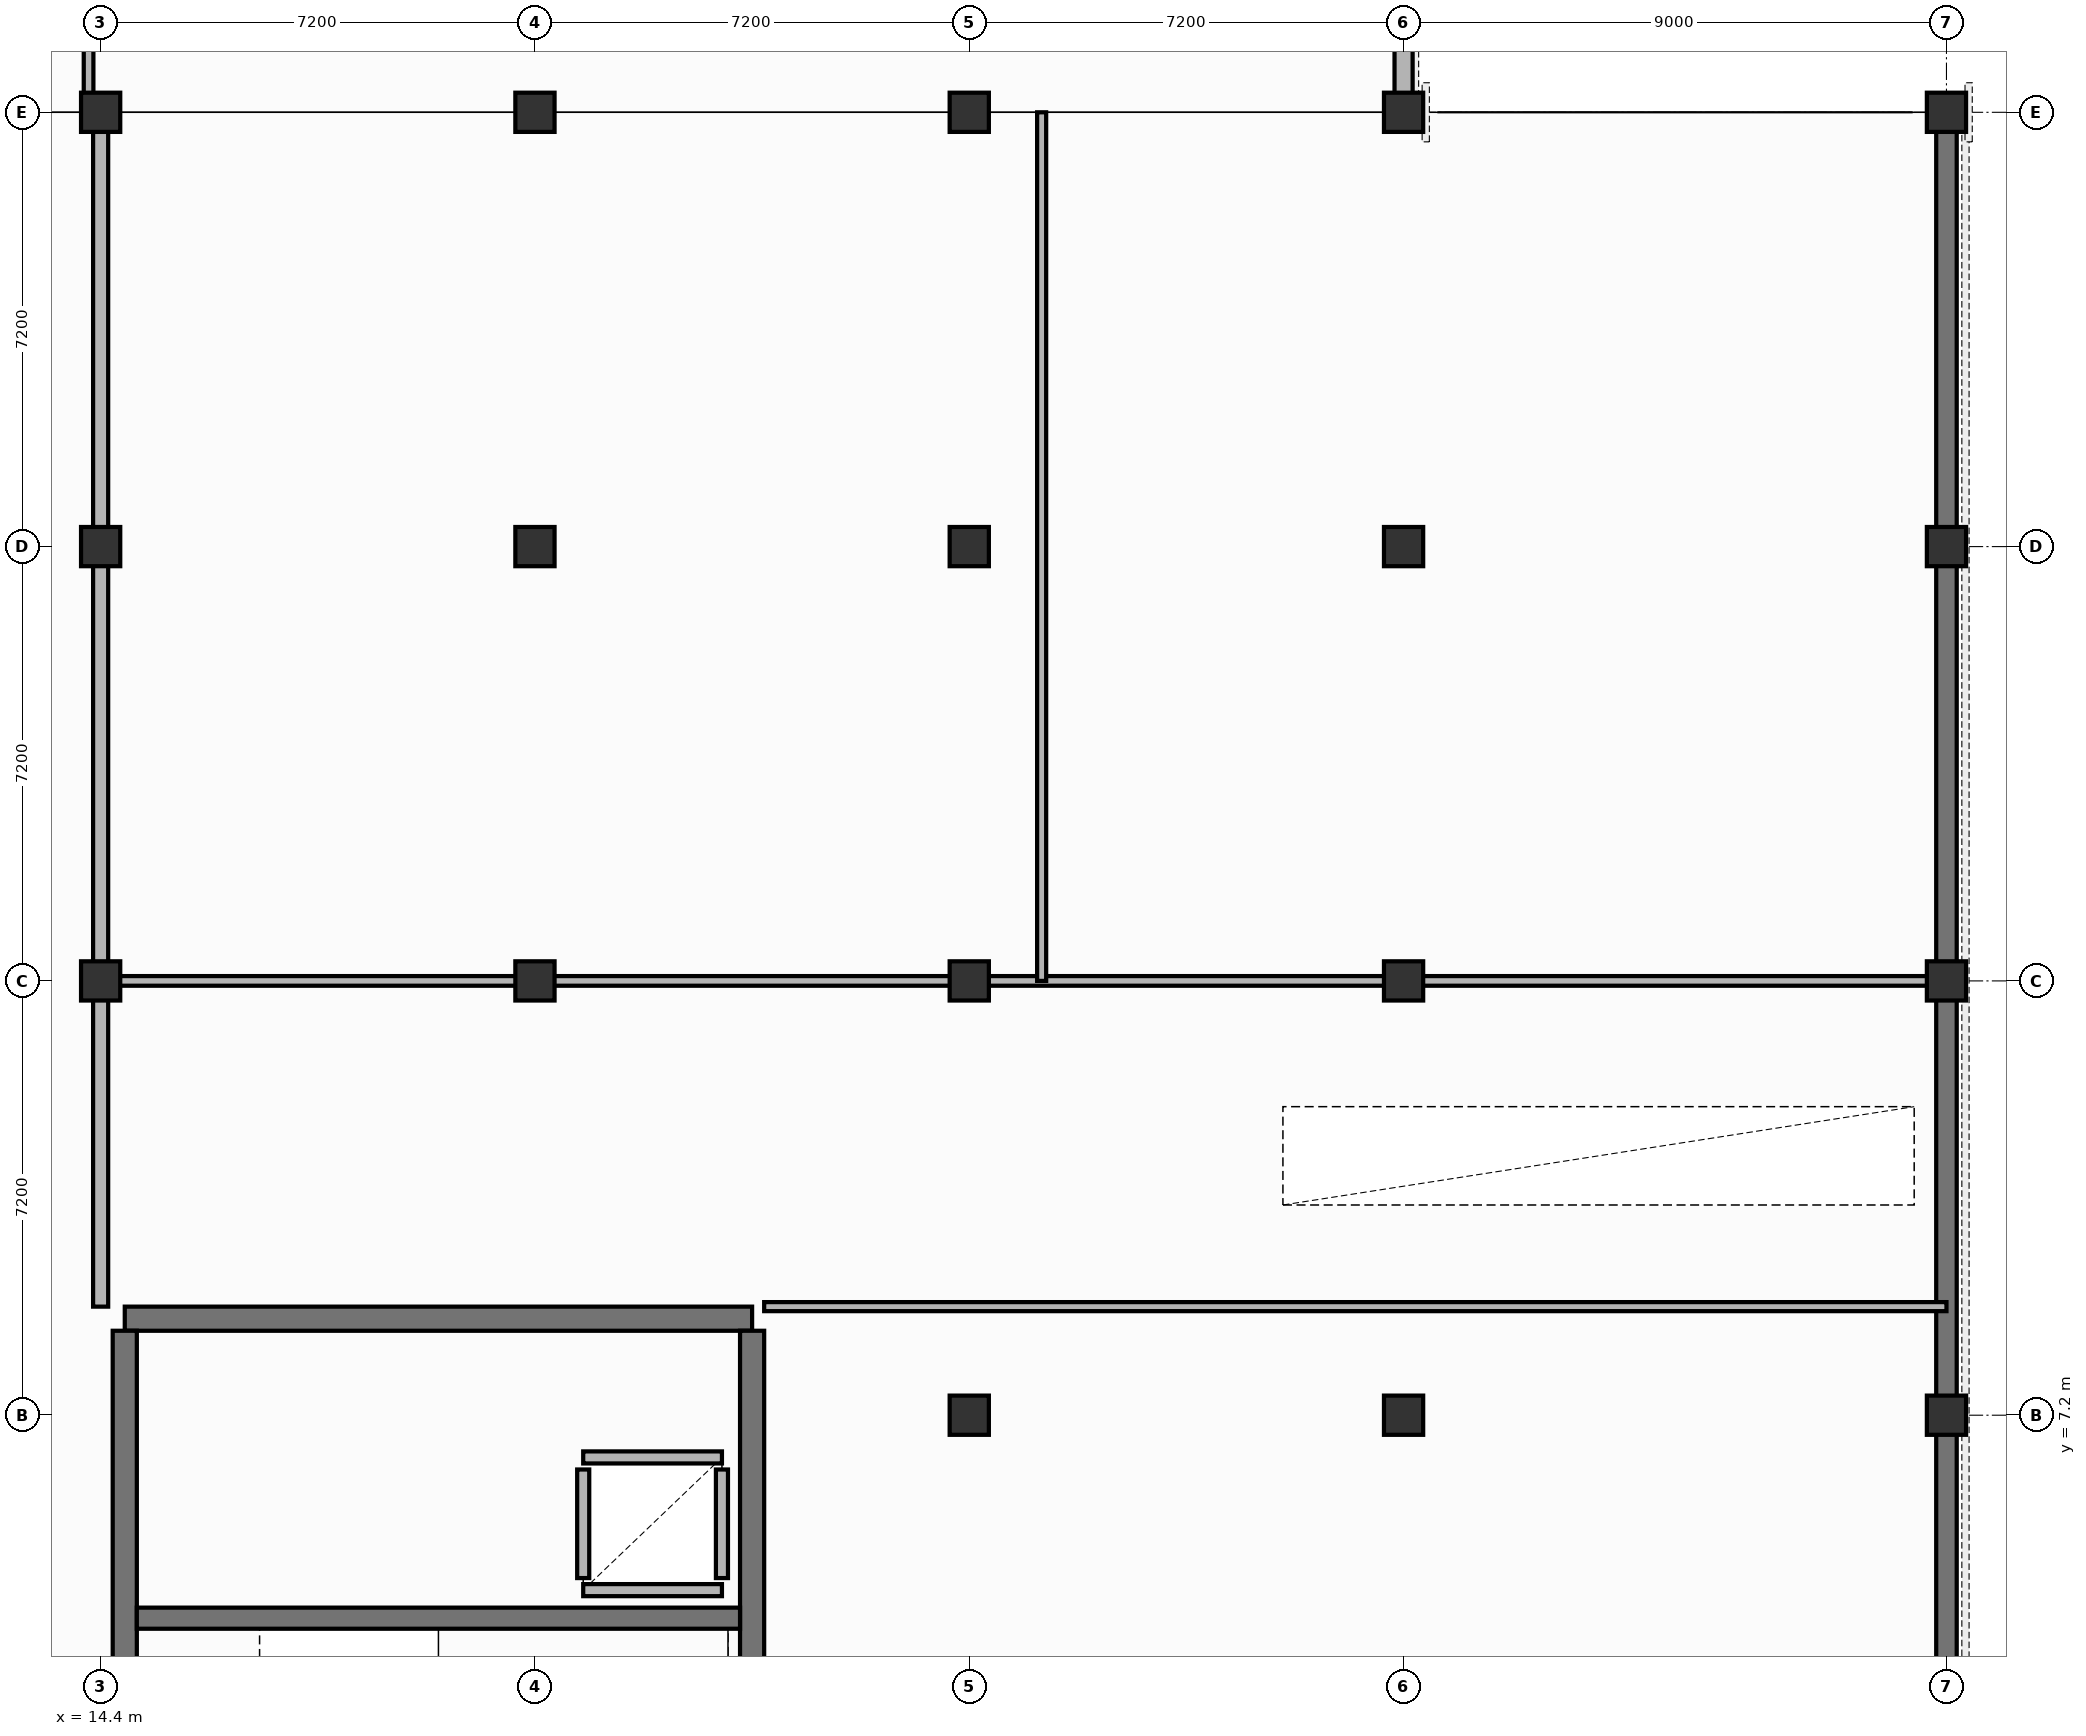
"""IFC4 building model, lengths in metres.
Left out: names, types, materials, properties, quantities, classifications, styles, units other than length and angle.
Written with IfcOpenShell. Run it as: python <this file> out.ifc"""

import sys

from ifc_helpers import new_model, si_unit, direction, frame, frame_2d, origin, origin_2d, place, context, subcontext, project, spatial, rectangle, extrude, element, fill, save


model = new_model("IFC4")
c1 = context("Model", 3, precision=1e-05, world=origin(), true_north=direction((0.0, 1.0)))
c2 = subcontext(c1, "Body", "Model", "MODEL_VIEW")
j1 = project(units=[si_unit("LENGTHUNIT", "METRE"), si_unit("PLANEANGLEUNIT", "RADIAN")], contexts=[c1])
p1 = place(None, origin())
s1 = spatial("IfcSite", under=j1, at=p1, CompositionType="ELEMENT")
p2 = place(p1, origin())
s2 = spatial("IfcBuilding", under=s1, at=p2, CompositionType="ELEMENT")
p3 = place(p2, frame((0.0, 0.0, 5.1)))
s3 = spatial("IfcBuildingStorey", under=s2, at=p3, CompositionType="ELEMENT", Elevation=5.1)
for number, where, z_axis, x_axis in (
    (1, (14.4, 14.4, 0.0), (0.0, 0.0, 1.0), (1.0, 0.0, 0.0)),
    (2, (14.4, 21.6, 0.0), (0.0, 0.0, 1.0), (1.0, 0.0, 0.0)),
    (3, (14.4, 28.8, 0.0), (0.0, 0.0, 1.0), (1.0, 0.0, 0.0)),
    (4, (21.6, 14.4, 0.0), (0.0, 0.0, 1.0), (1.0, 0.0, 0.0)),
    (5, (21.6, 21.6, 0.0), (0.0, 0.0, 1.0), (1.0, 0.0, 0.0)),
    (6, (21.6, 28.8, 0.0), (0.0, 0.0, 1.0), (1.0, 0.0, 0.0)),
    (7, (28.8, 7.2, 0.0), (0.0, 0.0, 1.0), (1.0, 0.0, 0.0)),
    (8, (28.8, 14.4, 0.0), (0.0, 0.0, 1.0), (1.0, 0.0, 0.0)),
    (9, (28.8, 21.6, 0.0), (0.0, 0.0, 1.0), (1.0, 0.0, 0.0)),
    (10, (28.8, 28.8, 0.0), (0.0, 0.0, 1.0), (1.0, 0.0, 0.0)),
    (11, (36.0, 7.2, 0.0), (0.0, 0.0, 1.0), (1.0, 0.0, 0.0)),
    (12, (36.0, 14.4, 0.0), (0.0, 0.0, 1.0), (1.0, 0.0, 0.0)),
    (13, (36.0, 21.6, 0.0), (0.0, 0.0, 1.0), (1.0, 0.0, 0.0)),
    (14, (36.0, 28.8, 0.0), (0.0, 0.0, 1.0), (1.0, 0.0, 0.0)),
    (15, (45.0, 7.2, 0.0), (0.0, 0.0, 1.0), (1.0, 0.0, 0.0)),
    (16, (45.0, 14.4, 0.0), (0.0, 0.0, 1.0), (1.0, 0.0, 0.0)),
    (17, (45.0, 21.6, 0.0), (0.0, 0.0, 1.0), (1.0, 0.0, 0.0)),
    (18, (45.0, 28.8, 0.0), (0.0, 0.0, 1.0), (1.0, 0.0, 0.0)),
):
    element("IfcColumn", number, at=place(p3, frame(where, z_axis=z_axis, x_axis=x_axis)), inside=s3, PredefinedType="COLUMN", context=c2, shape_type="SweptSolid", body=[
        extrude(rectangle(XDim=0.65, YDim=0.65, at=origin_2d()), origin(), (0.0, 0.0, 1.0), 3.84),
    ])
p4 = place(p3, frame((36.0, 28.8, 0.0), z_axis=(0.0, 0.0, 1.0), x_axis=(0.0, 1.0, 0.0)))
e19 = element("IfcWall", 19, at=p4, inside=s3, PredefinedType="SOLIDWALL", context=c2, shape_type="SweptSolid", body=[
    extrude(rectangle(XDim=7.2, YDim=0.3, at=frame_2d((3.6, 0.0))), origin(), (0.0, 0.0, 1.0), 3.117),
])
p5 = place(p4, frame((1.6, 0.0, 0.85)))
e20 = element("IfcOpeningElement", 20, at=p5, cuts=e19, PredefinedType="OPENING", context=c2, shape_type="SweptSolid", body=[
    extrude(rectangle(XDim=1.95, YDim=2.1, at=frame_2d((0.975, 1.05))), frame((0.0, 0.16, 0.0), z_axis=(0.0, -1.0, 0.0), x_axis=(1.0, 0.0, 0.0)), (0.0, 0.0, 1.0), 0.32),
])
p6 = place(p4, frame((4.5, 0.0, 0.85)))
e21 = element("IfcOpeningElement", 21, at=p6, cuts=e19, PredefinedType="OPENING", context=c2, shape_type="SweptSolid", body=[
    extrude(rectangle(XDim=1.6, YDim=2.05, at=frame_2d((0.8, 1.025))), frame((0.0, 0.16, 0.0), z_axis=(0.0, -1.0, 0.0), x_axis=(1.0, 0.0, 0.0)), (0.0, 0.0, 1.0), 0.32),
])
p7 = place(p3, frame((45.0, 0.0, 0.0), z_axis=(0.0, 0.0, 1.0), x_axis=(0.0, 1.0, 0.0)))
e22 = element("IfcWall", 22, at=p7, inside=s3, PredefinedType="SOLIDWALL", context=c2, shape_type="SweptSolid", body=[
    extrude(rectangle(XDim=28.8, YDim=0.34, at=frame_2d((14.4, 0.0))), origin(), (0.0, 0.0, 1.0), 3.55),
])
p8 = place(p7, frame((2.8, 0.0, 0.255)))
e23 = element("IfcOpeningElement", 23, at=p8, cuts=e22, PredefinedType="OPENING", context=c2, shape_type="SweptSolid", body=[
    extrude(rectangle(XDim=2.4, YDim=2.4, at=frame_2d((1.2, 1.2))), frame((0.0, 0.18, 0.0), z_axis=(0.0, -1.0, 0.0), x_axis=(1.0, 0.0, 0.0)), (0.0, 0.0, 1.0), 0.36),
])
p9 = place(p7, frame((15.2, 0.0, 0.605)))
e24 = element("IfcOpeningElement", 24, at=p9, cuts=e22, PredefinedType="OPENING", context=c2, shape_type="SweptSolid", body=[
    extrude(rectangle(XDim=1.6, YDim=2.05, at=frame_2d((0.8, 1.025))), frame((0.0, 0.18, 0.0), z_axis=(0.0, -1.0, 0.0), x_axis=(1.0, 0.0, 0.0)), (0.0, 0.0, 1.0), 0.36),
])
p10 = place(p3, frame((14.8, 8.8, 0.0), z_axis=(0.0, 0.0, 1.0), x_axis=(1.0, 0.0, 0.0)))
e25 = element("IfcWall", 25, at=p10, inside=s3, PredefinedType="SHEAR", context=c2, shape_type="SweptSolid", body=[
    extrude(rectangle(XDim=10.4, YDim=0.4, at=frame_2d((5.2, 0.0))), origin(), (0.0, 0.0, 1.0), 3.55),
])
p11 = place(p10, frame((2.4, 0.0, 0.0)))
e26 = element("IfcOpeningElement", 26, at=p11, cuts=e25, PredefinedType="OPENING", context=c2, shape_type="SweptSolid", body=[
    extrude(rectangle(XDim=1.5, YDim=2.2, at=frame_2d((0.75, 1.1))), frame((0.0, 0.21, 0.0), z_axis=(0.0, -1.0, 0.0), x_axis=(1.0, 0.0, 0.0)), (0.0, 0.0, 1.0), 0.42),
])
for number, where, z_axis, x_axis in (
    (27, (14.8, 0.17, 0.0), (0.0, 0.0, 1.0), (0.0, 1.0, 0.0)),
    (28, (25.2, 0.17, 0.0), (0.0, 0.0, 1.0), (0.0, 1.0, 0.0)),
):
    element("IfcWall", number, at=place(p3, frame(where, z_axis=z_axis, x_axis=x_axis)), inside=s3, PredefinedType="SHEAR", context=c2, shape_type="SweptSolid", body=[
        extrude(rectangle(XDim=8.43, YDim=0.4, at=frame_2d((4.215, 0.0))), origin(), (0.0, 0.0, 1.0), 3.55),
    ])
p12 = place(p3, frame((15.0, 3.835, 0.0), z_axis=(0.0, 0.0, 1.0), x_axis=(1.0, 0.0, 0.0)))
e29 = element("IfcWall", 29, at=p12, inside=s3, PredefinedType="SHEAR", context=c2, shape_type="SweptSolid", body=[
    extrude(rectangle(XDim=10.0, YDim=0.35, at=frame_2d((5.0, 0.0))), origin(), (0.0, 0.0, 1.0), 3.55),
])
p13 = place(p12, frame((0.45, 0.0, 0.0)))
e30 = element("IfcOpeningElement", 30, at=p13, cuts=e29, PredefinedType="OPENING", context=c2, shape_type="SweptSolid", body=[
    extrude(rectangle(XDim=1.05, YDim=2.2, at=frame_2d((0.525, 1.1))), frame((0.0, 0.185, 0.0), z_axis=(0.0, -1.0, 0.0), x_axis=(1.0, 0.0, 0.0)), (0.0, 0.0, 1.0), 0.37),
])
for number, where, z_axis, x_axis in (
    (31, (22.4, 4.3, 0.0), (0.0, 0.0, 1.0), (1.0, 0.0, 0.0)),
    (32, (22.4, 6.5, 0.0), (0.0, 0.0, 1.0), (1.0, 0.0, 0.0)),
):
    element("IfcWall", number, at=place(p3, frame(where, z_axis=z_axis, x_axis=x_axis)), inside=s3, PredefinedType="PARTITIONING", context=c2, shape_type="SweptSolid", body=[
        extrude(rectangle(XDim=2.3, YDim=0.2, at=frame_2d((1.15, 0.0))), origin(), (0.0, 0.0, 1.0), 3.55),
    ])
p14 = place(p3, frame((22.4, 4.5, 0.0), z_axis=(0.0, 0.0, 1.0), x_axis=(0.0, 1.0, 0.0)))
e33 = element("IfcWall", 33, at=p14, inside=s3, PredefinedType="PARTITIONING", context=c2, shape_type="SweptSolid", body=[
    extrude(rectangle(XDim=1.8, YDim=0.2, at=frame_2d((0.9, 0.0))), origin(), (0.0, 0.0, 1.0), 3.55),
])
p15 = place(p14, frame((0.45, 0.0, 0.0)))
e34 = element("IfcOpeningElement", 34, at=p15, cuts=e33, PredefinedType="OPENING", context=c2, shape_type="SweptSolid", body=[
    extrude(rectangle(XDim=0.9, YDim=2.1, at=frame_2d((0.45, 1.05))), frame((0.0, 0.11, 0.0), z_axis=(0.0, -1.0, 0.0), x_axis=(1.0, 0.0, 0.0)), (0.0, 0.0, 1.0), 0.22),
])
p16 = place(p3, frame((24.7, 4.5, 0.0), z_axis=(0.0, 0.0, 1.0), x_axis=(0.0, 1.0, 0.0)))
e35 = element("IfcWall", 35, at=p16, inside=s3, PredefinedType="PARTITIONING", context=c2, shape_type="SweptSolid", body=[
    extrude(rectangle(XDim=1.8, YDim=0.2, at=frame_2d((0.9, 0.0))), origin(), (0.0, 0.0, 1.0), 3.55),
])
p17 = place(p3, frame((14.2, 28.8, 0.0), z_axis=(0.0, 0.0, 1.0), x_axis=(0.0, 1.0, 0.0)))
e36 = element("IfcWall", 36, at=p17, inside=s3, PredefinedType="PARTITIONING", context=c2, shape_type="SweptSolid", body=[
    extrude(rectangle(XDim=14.32, YDim=0.16, at=frame_2d((7.16, 0.0))), origin(), (0.0, 0.0, 1.0), 2.943),
])
p18 = place(p17, frame((4.5, 0.0, 0.0)))
e37 = element("IfcOpeningElement", 37, at=p18, cuts=e36, PredefinedType="OPENING", context=c2, shape_type="SweptSolid", body=[
    extrude(rectangle(XDim=1.6, YDim=2.2, at=frame_2d((0.8, 1.1))), frame((0.0, 0.09, 0.0), z_axis=(0.0, -1.0, 0.0), x_axis=(1.0, 0.0, 0.0)), (0.0, 0.0, 1.0), 0.18),
])
p19 = place(p3, frame((14.4, 9.0, 0.0), z_axis=(0.0, 0.0, 1.0), x_axis=(0.0, 1.0, 0.0)))
e38 = element("IfcWall", 38, at=p19, inside=s3, PredefinedType="PARTITIONING", context=c2, shape_type="SweptSolid", body=[
    extrude(rectangle(XDim=19.8, YDim=0.25, at=frame_2d((9.9, 0.0))), origin(), (0.0, 0.0, 1.0), 2.755),
])
p20 = place(p19, frame((1.8, 0.0, 0.0)))
e39 = element("IfcOpeningElement", 39, at=p20, cuts=e38, PredefinedType="OPENING", context=c2, shape_type="SweptSolid", body=[
    extrude(rectangle(XDim=1.8, YDim=2.3, at=frame_2d((0.9, 1.15))), frame((0.0, 0.135, 0.0), z_axis=(0.0, -1.0, 0.0), x_axis=(1.0, 0.0, 0.0)), (0.0, 0.0, 1.0), 0.27),
])
p21 = place(p19, frame((8.2, 0.0, 0.0)))
e40 = element("IfcOpeningElement", 40, at=p21, cuts=e38, PredefinedType="OPENING", context=c2, shape_type="SweptSolid", body=[
    extrude(rectangle(XDim=1.8, YDim=2.3, at=frame_2d((0.9, 1.15))), frame((0.0, 0.135, 0.0), z_axis=(0.0, -1.0, 0.0), x_axis=(1.0, 0.0, 0.0)), (0.0, 0.0, 1.0), 0.27),
])
p22 = place(p3, frame((14.6, 14.4, 0.0), z_axis=(0.0, 0.0, 1.0), x_axis=(1.0, 0.0, 0.0)))
e41 = element("IfcWall", 41, at=p22, inside=s3, PredefinedType="PARTITIONING", context=c2, shape_type="SweptSolid", body=[
    extrude(rectangle(XDim=30.4, YDim=0.16, at=frame_2d((15.2, 0.0))), origin(), (0.0, 0.0, 1.0), 2.675),
])
p23 = place(p22, frame((2.8, 0.0, 0.0)))
e42 = element("IfcOpeningElement", 42, at=p23, cuts=e41, PredefinedType="OPENING", context=c2, shape_type="SweptSolid", body=[
    extrude(rectangle(XDim=1.6, YDim=2.2, at=frame_2d((0.8, 1.1))), frame((0.0, 0.09, 0.0), z_axis=(0.0, -1.0, 0.0), x_axis=(1.0, 0.0, 0.0)), (0.0, 0.0, 1.0), 0.18),
])
p24 = place(p22, frame((18.2, 0.0, 0.0)))
e43 = element("IfcOpeningElement", 43, at=p24, cuts=e41, PredefinedType="OPENING", context=c2, shape_type="SweptSolid", body=[
    extrude(rectangle(XDim=1.6, YDim=2.2, at=frame_2d((0.8, 1.1))), frame((0.0, 0.09, 0.0), z_axis=(0.0, -1.0, 0.0), x_axis=(1.0, 0.0, 0.0)), (0.0, 0.0, 1.0), 0.18),
])
p25 = place(p3, frame((30.0, 14.4, 0.0), z_axis=(0.0, 0.0, 1.0), x_axis=(0.0, 1.0, 0.0)))
e44 = element("IfcWall", 44, at=p25, inside=s3, PredefinedType="PARTITIONING", context=c2, shape_type="SweptSolid", body=[
    extrude(rectangle(XDim=14.4, YDim=0.15, at=frame_2d((7.2, 0.0))), origin(), (0.0, 0.0, 1.0), 3.55),
])
p26 = place(p3, frame((25.4, 9.0, 0.0), z_axis=(0.0, 0.0, 1.0), x_axis=(1.0, 0.0, 0.0)))
e45 = element("IfcWall", 45, at=p26, inside=s3, PredefinedType="PARTITIONING", context=c2, shape_type="SweptSolid", body=[
    extrude(rectangle(XDim=19.6, YDim=0.15, at=frame_2d((9.8, 0.0))), origin(), (0.0, 0.0, 1.0), 3.55),
])
p27 = place(p26, frame((7.5, 0.0, 0.0)))
e46 = element("IfcOpeningElement", 46, at=p27, cuts=e45, PredefinedType="OPENING", context=c2, shape_type="SweptSolid", body=[
    extrude(rectangle(XDim=1.0, YDim=2.15, at=frame_2d((0.5, 1.075))), frame((0.0, 0.085, 0.0), z_axis=(0.0, -1.0, 0.0), x_axis=(1.0, 0.0, 0.0)), (0.0, 0.0, 1.0), 0.17),
])
p28 = place(p8, origin())
e47 = element("IfcWindow", 47, at=p28, inside=s3, PartitioningType="SINGLE_PANEL", PredefinedType="WINDOW", context=c2, shape_type="SweptSolid", body=[
    extrude(rectangle(XDim=2.4, YDim=2.4, at=frame_2d((1.2, 1.2))), frame((0.0, 0.03, 0.0), z_axis=(0.0, -1.0, 0.0), x_axis=(1.0, 0.0, 0.0)), (0.0, 0.0, 1.0), 0.06),
])
fill(e23, e47)
p29 = place(p9, origin())
e48 = element("IfcWindow", 48, at=p29, inside=s3, PartitioningType="SINGLE_PANEL", PredefinedType="WINDOW", context=c2, shape_type="SweptSolid", body=[
    extrude(rectangle(XDim=1.6, YDim=2.05, at=frame_2d((0.8, 1.025))), frame((0.0, 0.03, 0.0), z_axis=(0.0, -1.0, 0.0), x_axis=(1.0, 0.0, 0.0)), (0.0, 0.0, 1.0), 0.06),
])
fill(e24, e48)
p30 = place(p11, origin())
e49 = element("IfcDoor", 49, at=p30, inside=s3, OperationType="DOUBLE_DOOR_SINGLE_SWING", PredefinedType="DOOR", context=c2, shape_type="SweptSolid", body=[
    extrude(rectangle(XDim=1.5, YDim=2.2, at=frame_2d((0.75, 1.1))), frame((0.0, 0.025, 0.0), z_axis=(0.0, -1.0, 0.0), x_axis=(1.0, 0.0, 0.0)), (0.0, 0.0, 1.0), 0.05),
])
fill(e26, e49)
p31 = place(p13, origin())
e50 = element("IfcDoor", 50, at=p31, inside=s3, OperationType="SINGLE_SWING_RIGHT", PredefinedType="DOOR", context=c2, shape_type="SweptSolid", body=[
    extrude(rectangle(XDim=1.05, YDim=2.2, at=frame_2d((0.525, 1.1))), frame((0.0, 0.025, 0.0), z_axis=(0.0, -1.0, 0.0), x_axis=(1.0, 0.0, 0.0)), (0.0, 0.0, 1.0), 0.05),
])
fill(e30, e50)
p32 = place(p15, origin())
e51 = element("IfcDoor", 51, at=p32, inside=s3, OperationType="SINGLE_SWING_LEFT", PredefinedType="DOOR", context=c2, shape_type="SweptSolid", body=[
    extrude(rectangle(XDim=0.9, YDim=2.1, at=frame_2d((0.45, 1.05))), frame((0.0, 0.025, 0.0), z_axis=(0.0, -1.0, 0.0), x_axis=(1.0, 0.0, 0.0)), (0.0, 0.0, 1.0), 0.05),
])
fill(e34, e51)
p33 = place(p20, origin())
e52 = element("IfcDoor", 52, at=p33, inside=s3, OperationType="DOUBLE_DOOR_SINGLE_SWING", PredefinedType="DOOR", context=c2, shape_type="SweptSolid", body=[
    extrude(rectangle(XDim=1.8, YDim=2.3, at=frame_2d((0.9, 1.15))), frame((0.0, 0.025, 0.0), z_axis=(0.0, -1.0, 0.0), x_axis=(1.0, 0.0, 0.0)), (0.0, 0.0, 1.0), 0.05),
])
fill(e39, e52)
p34 = place(p21, origin())
e53 = element("IfcDoor", 53, at=p34, inside=s3, OperationType="DOUBLE_DOOR_SINGLE_SWING", PredefinedType="DOOR", context=c2, shape_type="SweptSolid", body=[
    extrude(rectangle(XDim=1.8, YDim=2.3, at=frame_2d((0.9, 1.15))), frame((0.0, 0.025, 0.0), z_axis=(0.0, -1.0, 0.0), x_axis=(1.0, 0.0, 0.0)), (0.0, 0.0, 1.0), 0.05),
])
fill(e40, e53)
p35 = place(p23, origin())
e54 = element("IfcDoor", 54, at=p35, inside=s3, OperationType="DOUBLE_DOOR_SINGLE_SWING", PredefinedType="DOOR", context=c2, shape_type="SweptSolid", body=[
    extrude(rectangle(XDim=1.6, YDim=2.2, at=frame_2d((0.8, 1.1))), frame((0.0, 0.025, 0.0), z_axis=(0.0, -1.0, 0.0), x_axis=(1.0, 0.0, 0.0)), (0.0, 0.0, 1.0), 0.05),
])
fill(e42, e54)
p36 = place(p24, origin())
e55 = element("IfcDoor", 55, at=p36, inside=s3, OperationType="DOUBLE_DOOR_SINGLE_SWING", PredefinedType="DOOR", context=c2, shape_type="SweptSolid", body=[
    extrude(rectangle(XDim=1.6, YDim=2.2, at=frame_2d((0.8, 1.1))), frame((0.0, 0.025, 0.0), z_axis=(0.0, -1.0, 0.0), x_axis=(1.0, 0.0, 0.0)), (0.0, 0.0, 1.0), 0.05),
])
fill(e43, e55)
p37 = place(p27, origin())
e56 = element("IfcDoor", 56, at=p37, inside=s3, OperationType="SINGLE_SWING_LEFT", PredefinedType="DOOR", context=c2, shape_type="SweptSolid", body=[
    extrude(rectangle(XDim=1.0, YDim=2.15, at=frame_2d((0.5, 1.075))), frame((0.0, 0.025, 0.0), z_axis=(0.0, -1.0, 0.0), x_axis=(1.0, 0.0, 0.0)), (0.0, 0.0, 1.0), 0.05),
])
fill(e46, e56)
save(model, sys.argv[1])
